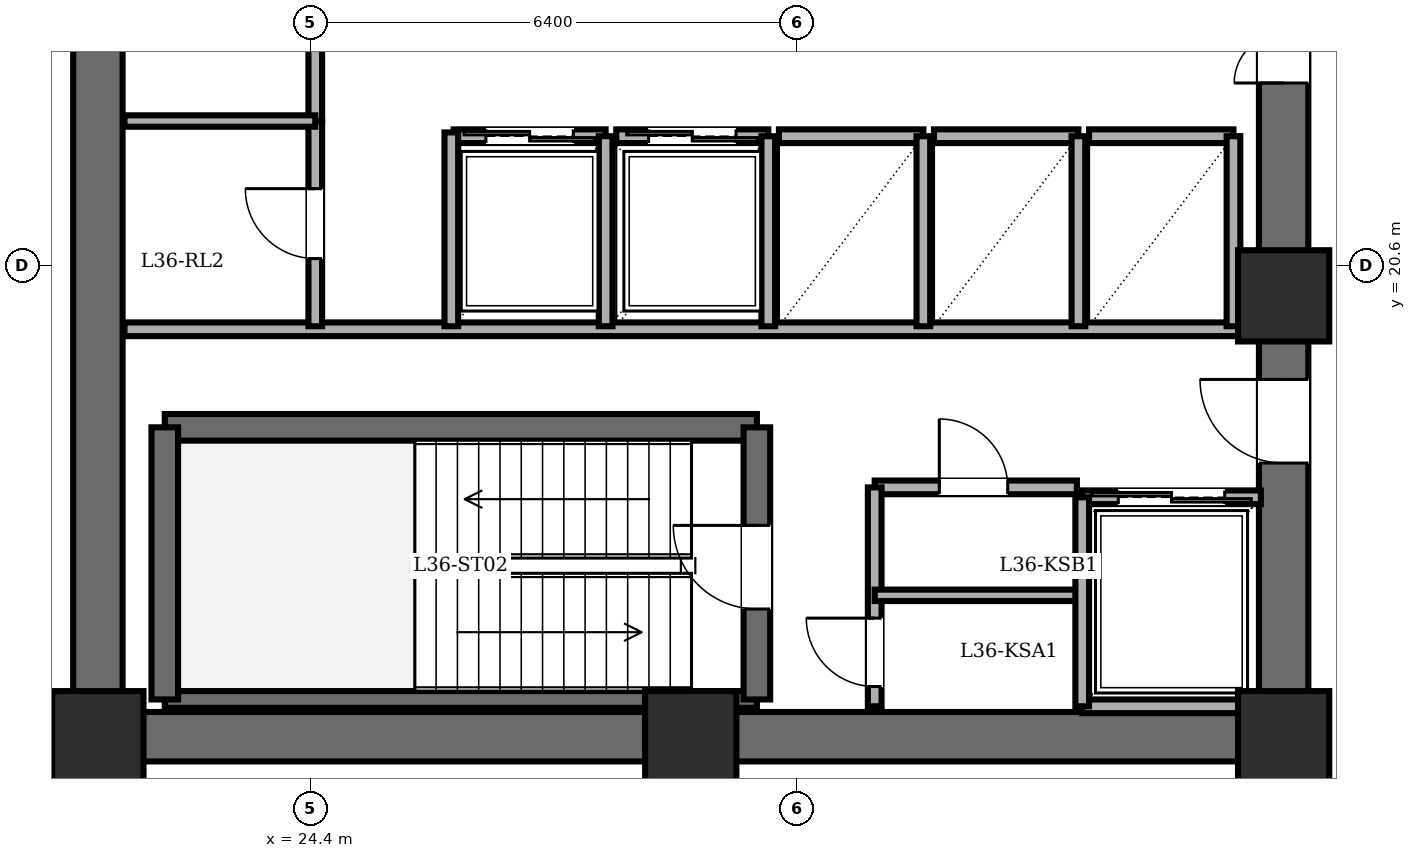
"""IFC4 building model, lengths in metres.
Left out: names, types, materials, properties, quantities, classifications, styles, units other than length and angle.
Written with IfcOpenShell. Run it as: python <this file> out.ifc"""

import sys

from ifc_helpers import new_model, si_unit, direction, frame, frame_2d, origin, origin_2d, place, context, subcontext, project, spatial, rectangle, extrude, element, fill, save


model = new_model("IFC4")
c1 = context("Model", 3, precision=1e-05, world=origin(), true_north=direction((0.0, 1.0)))
c2 = subcontext(c1, "Body", "Model", "MODEL_VIEW")
j1 = project(units=[si_unit("LENGTHUNIT", "METRE"), si_unit("PLANEANGLEUNIT", "RADIAN")], contexts=[c1])
p1 = place(None, origin())
s1 = spatial("IfcSite", under=j1, at=p1, CompositionType="ELEMENT")
p2 = place(p1, origin())
s2 = spatial("IfcBuilding", under=s1, at=p2, CompositionType="ELEMENT")
p3 = place(p2, frame((0.0, 0.0, 138.7)))
s3 = spatial("IfcBuildingStorey", under=s2, at=p3, CompositionType="ELEMENT", Elevation=138.7)
for number, where, z_axis, x_axis in (
    (1, (21.6, 14.4, 0.0), (0.0, 0.0, 1.0), (1.0, 0.0, 0.0)),
    (2, (29.4, 14.4, 0.0), (0.0, 0.0, 1.0), (1.0, 0.0, 0.0)),
    (3, (37.2, 14.4, 0.0), (0.0, 0.0, 1.0), (1.0, 0.0, 0.0)),
    (4, (37.2, 20.2, 0.0), (0.0, 0.0, 1.0), (1.0, 0.0, 0.0)),
):
    element("IfcColumn", number, at=place(p3, frame(where, z_axis=z_axis, x_axis=x_axis)), inside=s3, PredefinedType="COLUMN", context=c2, shape_type="SweptSolid", body=[
        extrude(rectangle(XDim=1.2, YDim=1.2, at=origin_2d()), origin(), (0.0, 0.0, 1.0), 5.1),
    ])
p4 = place(p3, frame((21.6, 14.4, 0.0), z_axis=(0.0, 0.0, 1.0), x_axis=(0.0, 1.0, 0.0)))
e5 = element("IfcWall", 5, at=p4, inside=s3, PredefinedType="SHEAR", context=c2, shape_type="SweptSolid", body=[
    extrude(rectangle(XDim=19.2, YDim=0.65, at=frame_2d((9.6, 0.0))), origin(), (0.0, 0.0, 1.0), 4.9),
])
p5 = place(p3, frame((37.2, 14.4, 0.0), z_axis=(0.0, 0.0, 1.0), x_axis=(-1.0, 0.0, 0.0)))
e6 = element("IfcWall", 6, at=p5, inside=s3, PredefinedType="SHEAR", context=c2, shape_type="SweptSolid", body=[
    extrude(rectangle(XDim=15.6, YDim=0.65, at=frame_2d((7.8, 0.0))), origin(), (0.0, 0.0, 1.0), 4.9),
])
p6 = place(p3, frame((37.2, 14.4, 0.0), z_axis=(0.0, 0.0, 1.0), x_axis=(0.0, 1.0, 0.0)))
e7 = element("IfcWall", 7, at=p6, inside=s3, PredefinedType="SHEAR", context=c2, shape_type="SweptSolid", body=[
    extrude(rectangle(XDim=19.2, YDim=0.65, at=frame_2d((9.6, 0.0))), origin(), (0.0, 0.0, 1.0), 4.9),
])
p7 = place(p6, frame((15.8, 0.0, 0.0)))
e8 = element("IfcOpeningElement", 8, at=p7, cuts=e7, PredefinedType="OPENING", context=c2, shape_type="SweptSolid", body=[
    extrude(rectangle(XDim=1.15, YDim=2.15, at=frame_2d((0.575, 1.075))), frame((0.0, 0.335, 0.0), z_axis=(0.0, -1.0, 0.0), x_axis=(1.0, 0.0, 0.0)), (0.0, 0.0, 1.0), 0.67),
])
p8 = place(p6, frame((3.6, 0.0, 0.0)))
e9 = element("IfcOpeningElement", 9, at=p8, cuts=e7, PredefinedType="OPENING", context=c2, shape_type="SweptSolid", body=[
    extrude(rectangle(XDim=1.1, YDim=2.15, at=frame_2d((0.55, 1.075))), frame((0.0, 0.335, 0.0), z_axis=(0.0, -1.0, 0.0), x_axis=(1.0, 0.0, 0.0)), (0.0, 0.0, 1.0), 0.67),
])
p9 = place(p6, frame((8.6, 0.0, 0.0)))
e10 = element("IfcOpeningElement", 10, at=p9, cuts=e7, PredefinedType="OPENING", context=c2, shape_type="SweptSolid", body=[
    extrude(rectangle(XDim=1.3, YDim=2.2, at=frame_2d((0.65, 1.1))), frame((0.0, 0.335, 0.0), z_axis=(0.0, -1.0, 0.0), x_axis=(1.0, 0.0, 0.0)), (0.0, 0.0, 1.0), 0.67),
])
p10 = place(p3, frame((22.48, 18.47, 0.0), z_axis=(0.0, 0.0, 1.0), x_axis=(1.0, 0.0, 0.0)))
e11 = element("IfcWall", 11, at=p10, inside=s3, PredefinedType="SOLIDWALL", context=c2, shape_type="SweptSolid", body=[
    extrude(rectangle(XDim=7.79, YDim=0.35, at=frame_2d((3.895, 0.0))), origin(), (0.0, 0.0, 1.0), 4.9),
])
p11 = place(p3, frame((22.48, 14.89, 0.0), z_axis=(0.0, 0.0, 1.0), x_axis=(1.0, 0.0, 0.0)))
e12 = element("IfcWall", 12, at=p11, inside=s3, PredefinedType="PARTITIONING", context=c2, shape_type="SweptSolid", body=[
    extrude(rectangle(XDim=7.79, YDim=0.22, at=frame_2d((3.895, 0.0))), origin(), (0.0, 0.0, 1.0), 4.9),
])
p12 = place(p3, frame((22.48, 14.89, 0.0), z_axis=(0.0, 0.0, 1.0), x_axis=(0.0, 1.0, 0.0)))
e13 = element("IfcWall", 13, at=p12, inside=s3, PredefinedType="SOLIDWALL", context=c2, shape_type="SweptSolid", body=[
    extrude(rectangle(XDim=3.58, YDim=0.35, at=frame_2d((1.79, 0.0))), origin(), (0.0, 0.0, 1.0), 4.9),
])
p13 = place(p3, frame((30.27, 14.89, 0.0), z_axis=(0.0, 0.0, 1.0), x_axis=(0.0, 1.0, 0.0)))
e14 = element("IfcWall", 14, at=p13, inside=s3, PredefinedType="SOLIDWALL", context=c2, shape_type="SweptSolid", body=[
    extrude(rectangle(XDim=3.58, YDim=0.35, at=frame_2d((1.79, 0.0))), origin(), (0.0, 0.0, 1.0), 4.9),
])
p14 = place(p13, frame((1.19, 0.0, 0.0)))
e15 = element("IfcOpeningElement", 15, at=p14, cuts=e14, PredefinedType="OPENING", context=c2, shape_type="SweptSolid", body=[
    extrude(rectangle(XDim=1.1, YDim=2.15, at=frame_2d((0.55, 1.075))), frame((0.0, 0.185, 0.0), z_axis=(0.0, -1.0, 0.0), x_axis=(1.0, 0.0, 0.0)), (0.0, 0.0, 1.0), 0.37),
])
p15 = place(p3, frame((21.95, 19.76, 0.0), z_axis=(0.0, 0.0, 1.0), x_axis=(1.0, 0.0, 0.0)))
e16 = element("IfcWall", 16, at=p15, inside=s3, PredefinedType="PARTITIONING", context=c2, shape_type="SweptSolid", body=[
    extrude(rectangle(XDim=14.87, YDim=0.18, at=frame_2d((7.435, 0.0))), origin(), (0.0, 0.0, 1.0), 4.9),
])
p16 = place(p3, frame((31.82, 17.68, 0.0), z_axis=(0.0, 0.0, 1.0), x_axis=(1.0, 0.0, 0.0)))
e17 = element("IfcWall", 17, at=p16, inside=s3, PredefinedType="PARTITIONING", context=c2, shape_type="SweptSolid", body=[
    extrude(rectangle(XDim=2.66, YDim=0.18, at=frame_2d((1.33, 0.0))), origin(), (0.0, 0.0, 1.0), 4.9),
])
p17 = place(p16, frame((0.85, 0.0, 0.0)))
e18 = element("IfcOpeningElement", 18, at=p17, cuts=e17, PredefinedType="OPENING", context=c2, shape_type="SweptSolid", body=[
    extrude(rectangle(XDim=0.9, YDim=2.05, at=frame_2d((0.45, 1.025))), frame((0.0, 0.1, 0.0), z_axis=(0.0, -1.0, 0.0), x_axis=(1.0, 0.0, 0.0)), (0.0, 0.0, 1.0), 0.2),
])
p18 = place(p3, frame((31.82, 14.8, 0.0), z_axis=(0.0, 0.0, 1.0), x_axis=(0.0, 1.0, 0.0)))
e19 = element("IfcWall", 19, at=p18, inside=s3, PredefinedType="PARTITIONING", context=c2, shape_type="SweptSolid", body=[
    extrude(rectangle(XDim=2.88, YDim=0.18, at=frame_2d((1.44, 0.0))), origin(), (0.0, 0.0, 1.0), 4.9),
])
p19 = place(p18, frame((0.26, 0.0, 0.0)))
e20 = element("IfcOpeningElement", 20, at=p19, cuts=e19, PredefinedType="OPENING", context=c2, shape_type="SweptSolid", body=[
    extrude(rectangle(XDim=0.9, YDim=2.05, at=frame_2d((0.45, 1.025))), frame((0.0, 0.1, 0.0), z_axis=(0.0, -1.0, 0.0), x_axis=(1.0, 0.0, 0.0)), (0.0, 0.0, 1.0), 0.2),
])
p20 = place(p3, frame((31.82, 16.26, 0.0), z_axis=(0.0, 0.0, 1.0), x_axis=(1.0, 0.0, 0.0)))
e21 = element("IfcWall", 21, at=p20, inside=s3, PredefinedType="PARTITIONING", context=c2, shape_type="SweptSolid", body=[
    extrude(rectangle(XDim=2.66, YDim=0.15, at=frame_2d((1.33, 0.0))), origin(), (0.0, 0.0, 1.0), 4.9),
])
p21 = place(p3, frame((34.55, 17.55, 0.0), z_axis=(0.0, 0.0, 1.0), x_axis=(1.0, 0.0, 0.0)))
e22 = element("IfcWall", 22, at=p21, inside=s3, PredefinedType="PARTITIONING", context=c2, shape_type="SweptSolid", body=[
    extrude(rectangle(XDim=2.35, YDim=0.18, at=frame_2d((1.175, 0.0))), origin(), (0.0, 0.0, 1.0), 4.9),
])
p22 = place(p21, frame((0.475, 0.0, 0.0)))
e23 = element("IfcOpeningElement", 23, at=p22, cuts=e22, PredefinedType="OPENING", context=c2, shape_type="SweptSolid", body=[
    extrude(rectangle(XDim=1.4, YDim=2.3, at=frame_2d((0.7, 1.15))), frame((0.0, 0.1, 0.0), z_axis=(0.0, -1.0, 0.0), x_axis=(1.0, 0.0, 0.0)), (0.0, 0.0, 1.0), 0.2),
])
p23 = place(p3, frame((36.9, 14.8, 0.0), z_axis=(0.0, 0.0, 1.0), x_axis=(-1.0, 0.0, 0.0)))
e24 = element("IfcWall", 24, at=p23, inside=s3, PredefinedType="PARTITIONING", context=c2, shape_type="SweptSolid", body=[
    extrude(rectangle(XDim=2.35, YDim=0.18, at=frame_2d((1.175, 0.0))), origin(), (0.0, 0.0, 1.0), 4.9),
])
p24 = place(p3, frame((34.55, 17.55, 0.0), z_axis=(0.0, 0.0, 1.0), x_axis=(0.0, -1.0, 0.0)))
e25 = element("IfcWall", 25, at=p24, inside=s3, PredefinedType="PARTITIONING", context=c2, shape_type="SweptSolid", body=[
    extrude(rectangle(XDim=2.75, YDim=0.18, at=frame_2d((1.375, 0.0))), origin(), (0.0, 0.0, 1.0), 4.9),
])
p25 = place(p3, frame((26.28, 22.3, 0.0), z_axis=(0.0, 0.0, 1.0), x_axis=(1.0, 0.0, 0.0)))
e26 = element("IfcWall", 26, at=p25, inside=s3, PredefinedType="PARTITIONING", context=c2, shape_type="SweptSolid", body=[
    extrude(rectangle(XDim=2.0, YDim=0.18, at=frame_2d((1.0, 0.0))), origin(), (0.0, 0.0, 1.0), 4.9),
])
p26 = place(p25, frame((0.425, 0.0, 0.0)))
e27 = element("IfcOpeningElement", 27, at=p26, cuts=e26, PredefinedType="OPENING", context=c2, shape_type="SweptSolid", body=[
    extrude(rectangle(XDim=1.15, YDim=2.2, at=frame_2d((0.575, 1.1))), frame((0.0, 0.1, 0.0), z_axis=(0.0, -1.0, 0.0), x_axis=(1.0, 0.0, 0.0)), (0.0, 0.0, 1.0), 0.2),
])
p27 = place(p3, frame((28.28, 19.8, 0.0), z_axis=(0.0, 0.0, 1.0), x_axis=(0.0, 1.0, 0.0)))
e28 = element("IfcWall", 28, at=p27, inside=s3, PredefinedType="PARTITIONING", context=c2, shape_type="SweptSolid", body=[
    extrude(rectangle(XDim=2.5, YDim=0.18, at=frame_2d((1.25, 0.0))), origin(), (0.0, 0.0, 1.0), 4.9),
])
p28 = place(p3, frame((28.42, 22.3, 0.0), z_axis=(0.0, 0.0, 1.0), x_axis=(1.0, 0.0, 0.0)))
e29 = element("IfcWall", 29, at=p28, inside=s3, PredefinedType="PARTITIONING", context=c2, shape_type="SweptSolid", body=[
    extrude(rectangle(XDim=2.0, YDim=0.18, at=frame_2d((1.0, 0.0))), origin(), (0.0, 0.0, 1.0), 4.9),
])
p29 = place(p28, frame((0.425, 0.0, 0.0)))
e30 = element("IfcOpeningElement", 30, at=p29, cuts=e29, PredefinedType="OPENING", context=c2, shape_type="SweptSolid", body=[
    extrude(rectangle(XDim=1.15, YDim=2.2, at=frame_2d((0.575, 1.1))), frame((0.0, 0.1, 0.0), z_axis=(0.0, -1.0, 0.0), x_axis=(1.0, 0.0, 0.0)), (0.0, 0.0, 1.0), 0.2),
])
p30 = place(p3, frame((30.42, 19.8, 0.0), z_axis=(0.0, 0.0, 1.0), x_axis=(0.0, 1.0, 0.0)))
e31 = element("IfcWall", 31, at=p30, inside=s3, PredefinedType="PARTITIONING", context=c2, shape_type="SweptSolid", body=[
    extrude(rectangle(XDim=2.5, YDim=0.18, at=frame_2d((1.25, 0.0))), origin(), (0.0, 0.0, 1.0), 4.9),
])
p31 = place(p3, frame((30.56, 22.3, 0.0), z_axis=(0.0, 0.0, 1.0), x_axis=(1.0, 0.0, 0.0)))
e32 = element("IfcWall", 32, at=p31, inside=s3, PredefinedType="PARTITIONING", context=c2, shape_type="SweptSolid", body=[
    extrude(rectangle(XDim=1.9, YDim=0.18, at=frame_2d((0.95, 0.0))), origin(), (0.0, 0.0, 1.0), 4.9),
])
p32 = place(p3, frame((32.46, 19.8, 0.0), z_axis=(0.0, 0.0, 1.0), x_axis=(0.0, 1.0, 0.0)))
e33 = element("IfcWall", 33, at=p32, inside=s3, PredefinedType="PARTITIONING", context=c2, shape_type="SweptSolid", body=[
    extrude(rectangle(XDim=2.5, YDim=0.18, at=frame_2d((1.25, 0.0))), origin(), (0.0, 0.0, 1.0), 4.9),
])
p33 = place(p3, frame((32.6, 22.3, 0.0), z_axis=(0.0, 0.0, 1.0), x_axis=(1.0, 0.0, 0.0)))
e34 = element("IfcWall", 34, at=p33, inside=s3, PredefinedType="PARTITIONING", context=c2, shape_type="SweptSolid", body=[
    extrude(rectangle(XDim=1.9, YDim=0.18, at=frame_2d((0.95, 0.0))), origin(), (0.0, 0.0, 1.0), 4.9),
])
p34 = place(p3, frame((34.5, 19.8, 0.0), z_axis=(0.0, 0.0, 1.0), x_axis=(0.0, 1.0, 0.0)))
e35 = element("IfcWall", 35, at=p34, inside=s3, PredefinedType="PARTITIONING", context=c2, shape_type="SweptSolid", body=[
    extrude(rectangle(XDim=2.5, YDim=0.18, at=frame_2d((1.25, 0.0))), origin(), (0.0, 0.0, 1.0), 4.9),
])
p35 = place(p3, frame((34.64, 22.3, 0.0), z_axis=(0.0, 0.0, 1.0), x_axis=(1.0, 0.0, 0.0)))
e36 = element("IfcWall", 36, at=p35, inside=s3, PredefinedType="PARTITIONING", context=c2, shape_type="SweptSolid", body=[
    extrude(rectangle(XDim=1.9, YDim=0.18, at=frame_2d((0.95, 0.0))), origin(), (0.0, 0.0, 1.0), 4.9),
])
p36 = place(p3, frame((36.54, 19.8, 0.0), z_axis=(0.0, 0.0, 1.0), x_axis=(0.0, 1.0, 0.0)))
e37 = element("IfcWall", 37, at=p36, inside=s3, PredefinedType="PARTITIONING", context=c2, shape_type="SweptSolid", body=[
    extrude(rectangle(XDim=2.5, YDim=0.18, at=frame_2d((1.25, 0.0))), origin(), (0.0, 0.0, 1.0), 4.9),
])
p37 = place(p3, frame((24.46, 22.5, 0.0), z_axis=(0.0, 0.0, 1.0), x_axis=(0.0, 1.0, 0.0)))
e38 = element("IfcWall", 38, at=p37, inside=s3, PredefinedType="PARTITIONING", context=c2, shape_type="SweptSolid", body=[
    extrude(rectangle(XDim=5.0, YDim=0.18, at=frame_2d((2.5, 0.0))), origin(), (0.0, 0.0, 1.0), 4.9),
])
p38 = place(p37, frame((2.04, 0.0, 0.0)))
e39 = element("IfcOpeningElement", 39, at=p38, cuts=e38, PredefinedType="OPENING", context=c2, shape_type="SweptSolid", body=[
    extrude(rectangle(XDim=0.92, YDim=2.1, at=frame_2d((0.46, 1.05))), frame((0.0, 0.1, 0.0), z_axis=(0.0, -1.0, 0.0), x_axis=(1.0, 0.0, 0.0)), (0.0, 0.0, 1.0), 0.2),
])
p39 = place(p3, frame((24.46, 19.8, 0.0), z_axis=(0.0, 0.0, 1.0), x_axis=(0.0, 1.0, 0.0)))
e40 = element("IfcWall", 40, at=p39, inside=s3, PredefinedType="PARTITIONING", context=c2, shape_type="SweptSolid", body=[
    extrude(rectangle(XDim=2.7, YDim=0.18, at=frame_2d((1.35, 0.0))), origin(), (0.0, 0.0, 1.0), 4.9),
])
p40 = place(p39, frame((0.89, 0.0, 0.0)))
e41 = element("IfcOpeningElement", 41, at=p40, cuts=e40, PredefinedType="OPENING", context=c2, shape_type="SweptSolid", body=[
    extrude(rectangle(XDim=0.92, YDim=2.1, at=frame_2d((0.46, 1.05))), frame((0.0, 0.1, 0.0), z_axis=(0.0, -1.0, 0.0), x_axis=(1.0, 0.0, 0.0)), (0.0, 0.0, 1.0), 0.2),
])
p41 = place(p3, frame((21.95, 22.5, 0.0), z_axis=(0.0, 0.0, 1.0), x_axis=(1.0, 0.0, 0.0)))
e42 = element("IfcWall", 42, at=p41, inside=s3, PredefinedType="PARTITIONING", context=c2, shape_type="SweptSolid", body=[
    extrude(rectangle(XDim=2.51, YDim=0.15, at=frame_2d((1.255, 0.0))), origin(), (0.0, 0.0, 1.0), 4.9),
])
p42 = place(p3, frame((26.25, 19.8, 0.0), z_axis=(0.0, 0.0, 1.0), x_axis=(0.0, 1.0, 0.0)))
e43 = element("IfcWall", 43, at=p42, inside=s3, PredefinedType="PARTITIONING", context=c2, shape_type="SweptSolid", body=[
    extrude(rectangle(XDim=2.55, YDim=0.18, at=frame_2d((1.275, 0.0))), origin(), (0.0, 0.0, 1.0), 4.9),
])
p43 = place(p3, frame((13.8, 14.2, 0.0), z_axis=(0.0, 0.0, 1.0), x_axis=(1.0, 0.0, 0.0)))
e44 = element("IfcWall", 44, at=p43, inside=s3, PredefinedType="PARTITIONING", context=c2, shape_type="SweptSolid", body=[
    extrude(rectangle(XDim=7.7, YDim=0.18, at=frame_2d((3.85, 0.0))), origin(), (0.0, 0.0, 1.0), 4.9),
])
p44 = place(p43, frame((3.39, 0.0, 0.0)))
e45 = element("IfcOpeningElement", 45, at=p44, cuts=e44, PredefinedType="OPENING", context=c2, shape_type="SweptSolid", body=[
    extrude(rectangle(XDim=0.92, YDim=2.1, at=frame_2d((0.46, 1.05))), frame((0.0, 0.1, 0.0), z_axis=(0.0, -1.0, 0.0), x_axis=(1.0, 0.0, 0.0)), (0.0, 0.0, 1.0), 0.2),
])
p45 = place(p14, origin())
e46 = element("IfcDoor", 46, at=p45, inside=s3, OperationType="SINGLE_SWING_RIGHT", PredefinedType="DOOR", context=c2, shape_type="SweptSolid", body=[
    extrude(rectangle(XDim=1.1, YDim=2.15, at=frame_2d((0.55, 1.075))), frame((0.0, 0.025, 0.0), z_axis=(0.0, -1.0, 0.0), x_axis=(1.0, 0.0, 0.0)), (0.0, 0.0, 1.0), 0.05),
])
fill(e15, e46)
p46 = place(p8, origin())
e47 = element("IfcDoor", 47, at=p46, inside=s3, OperationType="SINGLE_SWING_RIGHT", PredefinedType="DOOR", context=c2, shape_type="SweptSolid", body=[
    extrude(rectangle(XDim=1.1, YDim=2.15, at=frame_2d((0.55, 1.075))), frame((0.0, 0.025, 0.0), z_axis=(0.0, -1.0, 0.0), x_axis=(1.0, 0.0, 0.0)), (0.0, 0.0, 1.0), 0.05),
])
fill(e9, e47)
p47 = place(p17, origin())
e48 = element("IfcDoor", 48, at=p47, inside=s3, OperationType="SINGLE_SWING_LEFT", PredefinedType="DOOR", context=c2, shape_type="SweptSolid", body=[
    extrude(rectangle(XDim=0.9, YDim=2.05, at=frame_2d((0.45, 1.025))), frame((0.0, 0.025, 0.0), z_axis=(0.0, -1.0, 0.0), x_axis=(1.0, 0.0, 0.0)), (0.0, 0.0, 1.0), 0.05),
])
fill(e18, e48)
p48 = place(p19, origin())
e49 = element("IfcDoor", 49, at=p48, inside=s3, OperationType="SINGLE_SWING_RIGHT", PredefinedType="DOOR", context=c2, shape_type="SweptSolid", body=[
    extrude(rectangle(XDim=0.9, YDim=2.05, at=frame_2d((0.45, 1.025))), frame((0.0, 0.025, 0.0), z_axis=(0.0, -1.0, 0.0), x_axis=(1.0, 0.0, 0.0)), (0.0, 0.0, 1.0), 0.05),
])
fill(e20, e49)
p49 = place(p22, origin())
e50 = element("IfcDoor", 50, at=p49, inside=s3, OperationType="DOUBLE_DOOR_SLIDING", PredefinedType="DOOR", context=c2, shape_type="SweptSolid", body=[
    extrude(rectangle(XDim=1.4, YDim=2.3, at=frame_2d((0.7, 1.15))), frame((0.0, 0.025, 0.0), z_axis=(0.0, -1.0, 0.0), x_axis=(1.0, 0.0, 0.0)), (0.0, 0.0, 1.0), 0.05),
])
fill(e23, e50)
p50 = place(p26, origin())
e51 = element("IfcDoor", 51, at=p50, inside=s3, OperationType="DOUBLE_DOOR_SLIDING", PredefinedType="DOOR", context=c2, shape_type="SweptSolid", body=[
    extrude(rectangle(XDim=1.15, YDim=2.2, at=frame_2d((0.575, 1.1))), frame((0.0, 0.025, 0.0), z_axis=(0.0, -1.0, 0.0), x_axis=(1.0, 0.0, 0.0)), (0.0, 0.0, 1.0), 0.05),
])
fill(e27, e51)
p51 = place(p29, origin())
e52 = element("IfcDoor", 52, at=p51, inside=s3, OperationType="DOUBLE_DOOR_SLIDING", PredefinedType="DOOR", context=c2, shape_type="SweptSolid", body=[
    extrude(rectangle(XDim=1.15, YDim=2.2, at=frame_2d((0.575, 1.1))), frame((0.0, 0.025, 0.0), z_axis=(0.0, -1.0, 0.0), x_axis=(1.0, 0.0, 0.0)), (0.0, 0.0, 1.0), 0.05),
])
fill(e30, e52)
p52 = place(p40, origin())
e53 = element("IfcDoor", 53, at=p52, inside=s3, OperationType="SINGLE_SWING_RIGHT", PredefinedType="DOOR", context=c2, shape_type="SweptSolid", body=[
    extrude(rectangle(XDim=0.92, YDim=2.1, at=frame_2d((0.46, 1.05))), frame((0.0, 0.025, 0.0), z_axis=(0.0, -1.0, 0.0), x_axis=(1.0, 0.0, 0.0)), (0.0, 0.0, 1.0), 0.05),
])
fill(e41, e53)
p53 = place(p9, origin())
e54 = element("IfcDoor", 54, at=p53, inside=s3, OperationType="DOUBLE_DOOR_SINGLE_SWING", PredefinedType="DOOR", context=c2, shape_type="SweptSolid", body=[
    extrude(rectangle(XDim=1.3, YDim=2.2, at=frame_2d((0.65, 1.1))), frame((0.0, 0.025, 0.0), z_axis=(0.0, -1.0, 0.0), x_axis=(1.0, 0.0, 0.0)), (0.0, 0.0, 1.0), 0.05),
])
fill(e10, e54)
save(model, sys.argv[1])
